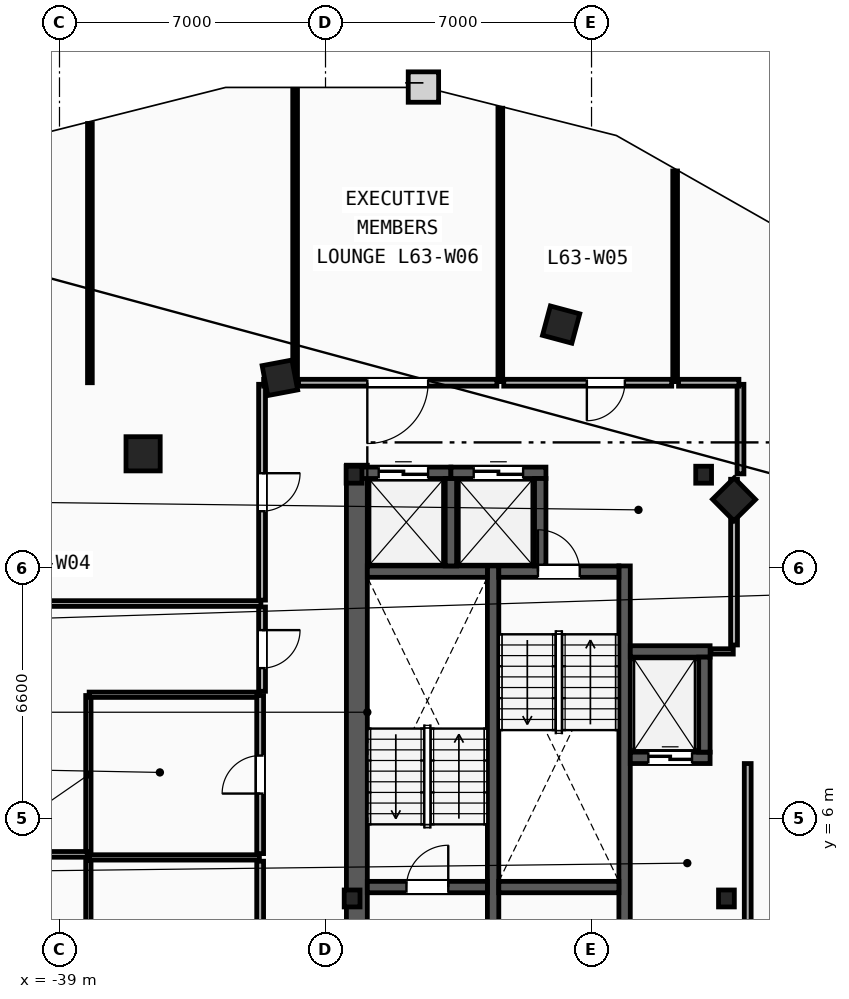
"""IFC4 building model, lengths in metres.
Left out: names, types, materials, properties, quantities, classifications, styles, units other than length and angle.
Written with IfcOpenShell. Run it as: python <this file> out.ifc"""

import sys

from ifc_helpers import new_model, si_unit, direction, frame, frame_2d, origin, origin_2d, place, context, subcontext, project, spatial, rectangle, i_section, extrude, element, fill, save


model = new_model("IFC4")
c1 = context("Model", 3, precision=1e-05, world=origin(), true_north=direction((0.0, 1.0)))
c2 = subcontext(c1, "Body", "Model", "MODEL_VIEW")
j1 = project(units=[si_unit("LENGTHUNIT", "METRE"), si_unit("PLANEANGLEUNIT", "RADIAN")], contexts=[c1])
p1 = place(None, origin())
s1 = spatial("IfcSite", under=j1, at=p1, CompositionType="ELEMENT")
p2 = place(p1, origin())
s2 = spatial("IfcBuilding", under=s1, at=p2, CompositionType="ELEMENT")
p3 = place(p2, frame((0.0, 0.0, 239.6)))
s3 = spatial("IfcBuildingStorey", under=s2, at=p3, CompositionType="ELEMENT", Elevation=239.6)
for number, where, z_axis, x_axis in (
    (1, (-31.3, 3.9, 0.0), (0.0, 0.0, 1.0), (1.0, 0.0, 0.0)),
    (2, (-21.45, 3.9, 0.0), (0.0, 0.0, 1.0), (1.0, 0.0, 0.0)),
    (3, (-22.05, 15.05, 0.0), (0.0, 0.0, 1.0), (1.0, 0.0, 0.0)),
    (4, (-31.25, 15.05, 0.0), (0.0, 0.0, 1.0), (1.0, 0.0, 0.0)),
):
    element("IfcColumn", number, at=place(p3, frame(where, z_axis=z_axis, x_axis=x_axis)), inside=s3, PredefinedType="COLUMN", context=c2, shape_type="SweptSolid", body=[
        extrude(i_section(OverallWidth=0.416, OverallDepth=0.446, WebThickness=0.039, FlangeThickness=0.063, FilletRadius=0.018, at=origin_2d()), origin(), (0.0, 0.0, 1.0), 3.6),
    ])
p4 = place(p3, frame((-36.8, 15.6, 0.0), z_axis=(0.0, 0.0, 1.0), x_axis=(1.0, 0.0, 0.0)))
e5 = element("IfcColumn", 5, at=p4, inside=s3, PredefinedType="COLUMN", context=c2, shape_type="SweptSolid", body=[
    extrude(rectangle(XDim=0.9, YDim=0.9, at=origin_2d()), origin(), (0.0, 0.0, 1.0), 3.6),
])
for number, where, z_axis, x_axis in (
    (6, (-21.25, 14.4, 0.0), (0.0, 0.0, 1.0), (-0.703, 0.711, 0.0)),
    (7, (-25.8, 19.0, 0.0), (0.0, 0.0, 1.0), (-0.966, 0.259, 0.0)),
    (8, (-33.2, 17.6, 0.0), (0.0, 0.0, 1.0), (-0.983, -0.186, 0.0)),
):
    element("IfcColumn", number, at=place(p3, frame(where, z_axis=z_axis, x_axis=x_axis)), inside=s3, PredefinedType="COLUMN", context=c2, shape_type="SweptSolid", body=[
        extrude(rectangle(XDim=0.8, YDim=0.8, at=origin_2d()), origin(), (0.0, 0.0, 1.0), 3.6),
    ])
p5 = place(p3, frame((-31.175, 1.97, 0.0), z_axis=(0.0, 0.0, 1.0), x_axis=(0.0, 1.0, 0.0)))
e9 = element("IfcWall", 9, at=p5, inside=s3, PredefinedType="SHEAR", context=c2, shape_type="SweptSolid", body=[
    extrude(rectangle(XDim=13.33, YDim=0.55, at=frame_2d((6.665, 0.0))), origin(), (0.0, 0.0, 1.0), 3.34),
])
for number, where, z_axis, x_axis in (
    (10, (-27.59, 1.97, 0.0), (0.0, 0.0, 1.0), (0.0, 1.0, 0.0)),
    (11, (-24.13, 1.97, 0.0), (0.0, 0.0, 1.0), (0.0, 1.0, 0.0)),
):
    element("IfcWall", number, at=place(p3, frame(where, z_axis=z_axis, x_axis=x_axis)), inside=s3, PredefinedType="SHEAR", context=c2, shape_type="SweptSolid", body=[
        extrude(rectangle(XDim=10.68, YDim=0.3, at=frame_2d((5.34, 0.0))), origin(), (0.0, 0.0, 1.0), 3.34),
    ])
p6 = place(p3, frame((-30.9, 4.2, 0.0), z_axis=(0.0, 0.0, 1.0), x_axis=(1.0, 0.0, 0.0)))
e12 = element("IfcWall", 12, at=p6, inside=s3, PredefinedType="SHEAR", context=c2, shape_type="SweptSolid", body=[
    extrude(rectangle(XDim=3.16, YDim=0.3, at=frame_2d((1.58, 0.0))), origin(), (0.0, 0.0, 1.0), 3.34),
])
p7 = place(p6, frame((1.03, 0.0, 0.0)))
e13 = element("IfcOpeningElement", 13, at=p7, cuts=e12, PredefinedType="OPENING", context=c2, shape_type="SweptSolid", body=[
    extrude(rectangle(XDim=1.1, YDim=2.15, at=frame_2d((0.55, 1.075))), frame((0.0, 0.16, 0.0), z_axis=(0.0, -1.0, 0.0), x_axis=(1.0, 0.0, 0.0)), (0.0, 0.0, 1.0), 0.32),
])
p8 = place(p3, frame((-30.9, 12.5, 0.0), z_axis=(0.0, 0.0, 1.0), x_axis=(1.0, 0.0, 0.0)))
e14 = element("IfcWall", 14, at=p8, inside=s3, PredefinedType="SHEAR", context=c2, shape_type="SweptSolid", body=[
    extrude(rectangle(XDim=3.16, YDim=0.3, at=frame_2d((1.58, 0.0))), origin(), (0.0, 0.0, 1.0), 3.34),
])
p9 = place(p3, frame((-27.44, 12.5, 0.0), z_axis=(0.0, 0.0, 1.0), x_axis=(1.0, 0.0, 0.0)))
e15 = element("IfcWall", 15, at=p9, inside=s3, PredefinedType="SHEAR", context=c2, shape_type="SweptSolid", body=[
    extrude(rectangle(XDim=3.16, YDim=0.3, at=frame_2d((1.58, 0.0))), origin(), (0.0, 0.0, 1.0), 3.34),
])
p10 = place(p9, frame((1.03, 0.0, 0.0)))
e16 = element("IfcOpeningElement", 16, at=p10, cuts=e15, PredefinedType="OPENING", context=c2, shape_type="SweptSolid", body=[
    extrude(rectangle(XDim=1.1, YDim=2.15, at=frame_2d((0.55, 1.075))), frame((0.0, 0.16, 0.0), z_axis=(0.0, -1.0, 0.0), x_axis=(1.0, 0.0, 0.0)), (0.0, 0.0, 1.0), 0.32),
])
p11 = place(p3, frame((-27.44, 4.2, 0.0), z_axis=(0.0, 0.0, 1.0), x_axis=(1.0, 0.0, 0.0)))
e17 = element("IfcWall", 17, at=p11, inside=s3, PredefinedType="SHEAR", context=c2, shape_type="SweptSolid", body=[
    extrude(rectangle(XDim=3.16, YDim=0.3, at=frame_2d((1.58, 0.0))), origin(), (0.0, 0.0, 1.0), 3.34),
])
p12 = place(p3, frame((-20.89, 2.15, 0.0), z_axis=(0.0, 0.0, 1.0), x_axis=(0.0, 1.0, 0.0)))
e18 = element("IfcWall", 18, at=p12, inside=s3, PredefinedType="PARTITIONING", context=c2, shape_type="SweptSolid", body=[
    extrude(rectangle(XDim=5.3, YDim=0.18, at=frame_2d((2.65, 0.0))), origin(), (0.0, 0.0, 1.0), 3.34),
])
p13 = place(p3, frame((-23.98, 7.6, 0.0), z_axis=(0.0, 0.0, 1.0), x_axis=(1.0, 0.0, 0.0)))
e19 = element("IfcWall", 19, at=p13, inside=s3, PredefinedType="SHEAR", context=c2, shape_type="SweptSolid", body=[
    extrude(rectangle(XDim=2.1, YDim=0.3, at=frame_2d((1.05, 0.0))), origin(), (0.0, 0.0, 1.0), 3.34),
])
p14 = place(p13, frame((0.475, 0.0, 0.0)))
e20 = element("IfcOpeningElement", 20, at=p14, cuts=e19, PredefinedType="OPENING", context=c2, shape_type="SweptSolid", body=[
    extrude(rectangle(XDim=1.15, YDim=2.2, at=frame_2d((0.575, 1.1))), frame((0.0, 0.16, 0.0), z_axis=(0.0, -1.0, 0.0), x_axis=(1.0, 0.0, 0.0)), (0.0, 0.0, 1.0), 0.32),
])
p15 = place(p3, frame((-23.98, 10.4, 0.0), z_axis=(0.0, 0.0, 1.0), x_axis=(1.0, 0.0, 0.0)))
e21 = element("IfcWall", 21, at=p15, inside=s3, PredefinedType="SHEAR", context=c2, shape_type="SweptSolid", body=[
    extrude(rectangle(XDim=2.1, YDim=0.3, at=frame_2d((1.05, 0.0))), origin(), (0.0, 0.0, 1.0), 3.34),
])
p16 = place(p3, frame((-22.03, 7.75, 0.0), z_axis=(0.0, 0.0, 1.0), x_axis=(0.0, 1.0, 0.0)))
e22 = element("IfcWall", 22, at=p16, inside=s3, PredefinedType="SHEAR", context=c2, shape_type="SweptSolid", body=[
    extrude(rectangle(XDim=2.5, YDim=0.3, at=frame_2d((1.25, 0.0))), origin(), (0.0, 0.0, 1.0), 3.34),
])
p17 = place(p3, frame((-31.2, 15.1, 0.0), z_axis=(0.0, 0.0, 1.0), x_axis=(1.0, 0.0, 0.0)))
e23 = element("IfcWall", 23, at=p17, inside=s3, PredefinedType="SHEAR", context=c2, shape_type="SweptSolid", body=[
    extrude(rectangle(XDim=2.5, YDim=0.3, at=frame_2d((1.25, 0.0))), origin(), (0.0, 0.0, 1.0), 3.34),
])
p18 = place(p17, frame((0.6, 0.0, 0.0)))
e24 = element("IfcOpeningElement", 24, at=p18, cuts=e23, PredefinedType="OPENING", context=c2, shape_type="SweptSolid", body=[
    extrude(rectangle(XDim=1.3, YDim=2.2, at=frame_2d((0.65, 1.1))), frame((0.0, 0.16, 0.0), z_axis=(0.0, -1.0, 0.0), x_axis=(1.0, 0.0, 0.0)), (0.0, 0.0, 1.0), 0.32),
])
p19 = place(p3, frame((-28.7, 12.65, 0.0), z_axis=(0.0, 0.0, 1.0), x_axis=(0.0, 1.0, 0.0)))
e25 = element("IfcWall", 25, at=p19, inside=s3, PredefinedType="SHEAR", context=c2, shape_type="SweptSolid", body=[
    extrude(rectangle(XDim=2.3, YDim=0.3, at=frame_2d((1.15, 0.0))), origin(), (0.0, 0.0, 1.0), 3.34),
])
p20 = place(p3, frame((-28.7, 15.1, 0.0), z_axis=(0.0, 0.0, 1.0), x_axis=(1.0, 0.0, 0.0)))
e26 = element("IfcWall", 26, at=p20, inside=s3, PredefinedType="SHEAR", context=c2, shape_type="SweptSolid", body=[
    extrude(rectangle(XDim=2.5, YDim=0.3, at=frame_2d((1.25, 0.0))), origin(), (0.0, 0.0, 1.0), 3.34),
])
p21 = place(p20, frame((0.6, 0.0, 0.0)))
e27 = element("IfcOpeningElement", 27, at=p21, cuts=e26, PredefinedType="OPENING", context=c2, shape_type="SweptSolid", body=[
    extrude(rectangle(XDim=1.3, YDim=2.2, at=frame_2d((0.65, 1.1))), frame((0.0, 0.16, 0.0), z_axis=(0.0, -1.0, 0.0), x_axis=(1.0, 0.0, 0.0)), (0.0, 0.0, 1.0), 0.32),
])
p22 = place(p3, frame((-26.35, 12.65, 0.0), z_axis=(0.0, 0.0, 1.0), x_axis=(0.0, 1.0, 0.0)))
e28 = element("IfcWall", 28, at=p22, inside=s3, PredefinedType="SHEAR", context=c2, shape_type="SweptSolid", body=[
    extrude(rectangle(XDim=2.3, YDim=0.3, at=frame_2d((1.15, 0.0))), origin(), (0.0, 0.0, 1.0), 3.34),
])
p23 = place(p3, frame((-21.86, 10.4, 0.0), z_axis=(0.0, 0.0, 1.0), x_axis=(1.0, 0.0, 0.0)))
e29 = element("IfcWall", 29, at=p23, inside=s3, PredefinedType="PARTITIONING", context=c2, shape_type="SweptSolid", body=[
    extrude(rectangle(XDim=0.59, YDim=0.14, at=frame_2d((0.295, 0.0))), origin(), (0.0, 0.0, 1.0), 3.34),
])
p24 = place(p3, frame((-21.25, 10.57, 0.0), z_axis=(0.0, 0.0, 1.0), x_axis=(0.0, 1.0, 0.0)))
e30 = element("IfcWall", 30, at=p24, inside=s3, PredefinedType="PARTITIONING", context=c2, shape_type="SweptSolid", body=[
    extrude(rectangle(XDim=4.36, YDim=0.18, at=frame_2d((2.18, 0.0))), origin(), (0.0, 0.0, 1.0), 3.34),
])
p25 = place(p3, frame((-38.24, 0.62, 0.0), z_axis=(0.0, 0.0, 1.0), x_axis=(0.0, 1.0, 0.0)))
e31 = element("IfcWall", 31, at=p25, inside=s3, PredefinedType="PARTITIONING", context=c2, shape_type="SweptSolid", body=[
    extrude(rectangle(XDim=4.275, YDim=0.14, at=frame_2d((2.137, 0.0))), origin(), (0.0, 0.0, 1.0), 3.34),
])
p26 = place(p3, frame((-38.24, 5.065, 0.0), z_axis=(0.0, 0.0, 1.0), x_axis=(0.0, 1.0, 0.0)))
e32 = element("IfcWall", 32, at=p26, inside=s3, PredefinedType="PARTITIONING", context=c2, shape_type="SweptSolid", body=[
    extrude(rectangle(XDim=4.175, YDim=0.14, at=frame_2d((2.087, 0.0))), origin(), (0.0, 0.0, 1.0), 3.34),
])
for number, where, z_axis, x_axis in (
    (33, (-38.22, 4.98, 0.0), (0.0, 0.0, 1.0), (1.0, 0.0, 0.0)),
    (34, (-38.22, 9.26, 0.0), (0.0, 0.0, 1.0), (1.0, 0.0, 0.0)),
):
    element("IfcWall", number, at=place(p3, frame(where, z_axis=z_axis, x_axis=x_axis)), inside=s3, PredefinedType="PARTITIONING", context=c2, shape_type="SweptSolid", body=[
        extrude(rectangle(XDim=4.48, YDim=0.14, at=frame_2d((2.24, 0.0))), origin(), (0.0, 0.0, 1.0), 3.34),
    ])
p27 = place(p3, frame((-33.72, 0.62, 0.0), z_axis=(0.0, 0.0, 1.0), x_axis=(0.0, 1.0, 0.0)))
e35 = element("IfcWall", 35, at=p27, inside=s3, PredefinedType="PARTITIONING", context=c2, shape_type="SweptSolid", body=[
    extrude(rectangle(XDim=4.26, YDim=0.18, at=frame_2d((2.13, 0.0))), origin(), (0.0, 0.0, 1.0), 3.34),
])
p28 = place(p27, frame((1.655, 0.0, 0.0)))
e36 = element("IfcOpeningElement", 36, at=p28, cuts=e35, PredefinedType="OPENING", context=c2, shape_type="SweptSolid", body=[
    extrude(rectangle(XDim=0.95, YDim=2.1, at=frame_2d((0.475, 1.05))), frame((0.0, 0.1, 0.0), z_axis=(0.0, -1.0, 0.0), x_axis=(1.0, 0.0, 0.0)), (0.0, 0.0, 1.0), 0.2),
])
p29 = place(p3, frame((-33.72, 5.08, 0.0), z_axis=(0.0, 0.0, 1.0), x_axis=(0.0, 1.0, 0.0)))
e37 = element("IfcWall", 37, at=p29, inside=s3, PredefinedType="PARTITIONING", context=c2, shape_type="SweptSolid", body=[
    extrude(rectangle(XDim=4.16, YDim=0.18, at=frame_2d((2.08, 0.0))), origin(), (0.0, 0.0, 1.0), 3.34),
])
p30 = place(p29, frame((1.58, 0.0, 0.0)))
e38 = element("IfcOpeningElement", 38, at=p30, cuts=e37, PredefinedType="OPENING", context=c2, shape_type="SweptSolid", body=[
    extrude(rectangle(XDim=1.0, YDim=2.15, at=frame_2d((0.5, 1.075))), frame((0.0, 0.1, 0.0), z_axis=(0.0, -1.0, 0.0), x_axis=(1.0, 0.0, 0.0)), (0.0, 0.0, 1.0), 0.2),
])
p31 = place(p3, frame((-50.913, 5.06, 0.0), z_axis=(0.0, 0.0, 1.0), x_axis=(1.0, 0.0, 0.0)))
e39 = element("IfcWall", 39, at=p31, inside=s3, PredefinedType="PARTITIONING", context=c2, shape_type="SweptSolid", body=[
    extrude(rectangle(XDim=12.643, YDim=0.15, at=frame_2d((6.321, 0.0))), origin(), (0.0, 0.0, 1.0), 3.34),
])
p32 = place(p3, frame((-49.883, 11.66, 0.0), z_axis=(0.0, 0.0, 1.0), x_axis=(1.0, 0.0, 0.0)))
e40 = element("IfcWall", 40, at=p32, inside=s3, PredefinedType="PARTITIONING", context=c2, shape_type="SweptSolid", body=[
    extrude(rectangle(XDim=16.183, YDim=0.15, at=frame_2d((8.091, 0.0))), origin(), (0.0, 0.0, 1.0), 3.34),
])
p33 = place(p3, frame((-38.2, 17.47, 0.0), z_axis=(0.0, 0.0, 1.0), x_axis=(0.0, 1.0, 0.0)))
e41 = element("IfcWall", 41, at=p33, inside=s3, PredefinedType="PARTITIONING", context=c2, shape_type="SweptSolid", body=[
    extrude(rectangle(XDim=6.82, YDim=0.125, at=frame_2d((3.41, 0.0))), origin(), (0.0, 0.0, 1.0), 3.34),
])
p34 = place(p3, frame((-32.8, 17.5, 0.0), z_axis=(0.0, 0.0, 1.0), x_axis=(0.0, 1.0, 0.0)))
e42 = element("IfcWall", 42, at=p34, inside=s3, PredefinedType="PARTITIONING", context=c2, shape_type="SweptSolid", body=[
    extrude(rectangle(XDim=7.69, YDim=0.125, at=frame_2d((3.845, 0.0))), origin(), (0.0, 0.0, 1.0), 3.34),
])
p35 = place(p3, frame((-27.4, 17.5, 0.0), z_axis=(0.0, 0.0, 1.0), x_axis=(0.0, 1.0, 0.0)))
e43 = element("IfcWall", 43, at=p35, inside=s3, PredefinedType="PARTITIONING", context=c2, shape_type="SweptSolid", body=[
    extrude(rectangle(XDim=7.193, YDim=0.125, at=frame_2d((3.596, 0.0))), origin(), (0.0, 0.0, 1.0), 3.34),
])
p36 = place(p3, frame((-22.8, 17.5, 0.0), z_axis=(0.0, 0.0, 1.0), x_axis=(0.0, 1.0, 0.0)))
e44 = element("IfcWall", 44, at=p36, inside=s3, PredefinedType="PARTITIONING", context=c2, shape_type="SweptSolid", body=[
    extrude(rectangle(XDim=5.542, YDim=0.125, at=frame_2d((2.771, 0.0))), origin(), (0.0, 0.0, 1.0), 3.34),
])
p37 = place(p3, frame((-33.67, 11.57, 0.0), z_axis=(0.0, 0.0, 1.0), x_axis=(0.0, -1.0, 0.0)))
e45 = element("IfcWall", 45, at=p37, inside=s3, PredefinedType="PARTITIONING", context=c2, shape_type="SweptSolid", body=[
    extrude(rectangle(XDim=2.219, YDim=0.18, at=frame_2d((1.109, 0.0))), origin(), (0.0, 0.0, 1.0), 3.34),
])
p38 = place(p37, frame((0.609, 0.0, 0.0)))
e46 = element("IfcOpeningElement", 46, at=p38, cuts=e45, PredefinedType="OPENING", context=c2, shape_type="SweptSolid", body=[
    extrude(rectangle(XDim=1.0, YDim=2.15, at=frame_2d((0.5, 1.075))), frame((0.0, 0.1, 0.0), z_axis=(0.0, -1.0, 0.0), x_axis=(1.0, 0.0, 0.0)), (0.0, 0.0, 1.0), 0.2),
])
p39 = place(p3, frame((-21.08, 15.072, 0.0), z_axis=(0.0, 0.0, 1.0), x_axis=(0.0, 1.0, 0.0)))
e47 = element("IfcWall", 47, at=p39, inside=s3, PredefinedType="PARTITIONING", context=c2, shape_type="SweptSolid", body=[
    extrude(rectangle(XDim=2.357, YDim=0.18, at=frame_2d((1.178, 0.0))), origin(), (0.0, 0.0, 1.0), 3.34),
])
p40 = place(p3, frame((-21.122, 17.47, 0.0), z_axis=(0.0, 0.0, 1.0), x_axis=(-1.0, 0.0, 0.0)))
e48 = element("IfcWall", 48, at=p40, inside=s3, PredefinedType="PARTITIONING", context=c2, shape_type="SweptSolid", body=[
    extrude(rectangle(XDim=1.588, YDim=0.18, at=frame_2d((0.794, 0.0))), origin(), (0.0, 0.0, 1.0), 3.34),
])
p41 = place(p3, frame((-33.67, 17.428, 0.0), z_axis=(0.0, 0.0, 1.0), x_axis=(0.0, -1.0, 0.0)))
e49 = element("IfcWall", 49, at=p41, inside=s3, PredefinedType="PARTITIONING", context=c2, shape_type="SweptSolid", body=[
    extrude(rectangle(XDim=5.678, YDim=0.18, at=frame_2d((2.839, 0.0))), origin(), (0.0, 0.0, 1.0), 3.34),
])
p42 = place(p41, frame((2.339, 0.0, 0.0)))
e50 = element("IfcOpeningElement", 50, at=p42, cuts=e49, PredefinedType="OPENING", context=c2, shape_type="SweptSolid", body=[
    extrude(rectangle(XDim=1.0, YDim=2.15, at=frame_2d((0.5, 1.075))), frame((0.0, 0.1, 0.0), z_axis=(0.0, -1.0, 0.0), x_axis=(1.0, 0.0, 0.0)), (0.0, 0.0, 1.0), 0.2),
])
p43 = place(p3, frame((-32.89, 17.47, 0.0), z_axis=(0.0, 0.0, 1.0), x_axis=(-1.0, 0.0, 0.0)))
e51 = element("IfcWall", 51, at=p43, inside=s3, PredefinedType="PARTITIONING", context=c2, shape_type="SweptSolid", body=[
    extrude(rectangle(XDim=0.739, YDim=0.18, at=frame_2d((0.369, 0.0))), origin(), (0.0, 0.0, 1.0), 3.34),
])
p44 = place(p3, frame((-22.89, 17.47, 0.0), z_axis=(0.0, 0.0, 1.0), x_axis=(-1.0, 0.0, 0.0)))
e52 = element("IfcWall", 52, at=p44, inside=s3, PredefinedType="PARTITIONING", context=c2, shape_type="SweptSolid", body=[
    extrude(rectangle(XDim=4.42, YDim=0.18, at=frame_2d((2.21, 0.0))), origin(), (0.0, 0.0, 1.0), 3.34),
])
p45 = place(p44, frame((1.233, 0.0, 0.0)))
e53 = element("IfcOpeningElement", 53, at=p45, cuts=e52, PredefinedType="OPENING", context=c2, shape_type="SweptSolid", body=[
    extrude(rectangle(XDim=1.0, YDim=2.15, at=frame_2d((0.5, 1.075))), frame((0.0, 0.1, 0.0), z_axis=(0.0, -1.0, 0.0), x_axis=(1.0, 0.0, 0.0)), (0.0, 0.0, 1.0), 0.2),
])
p46 = place(p3, frame((-27.49, 17.47, 0.0), z_axis=(0.0, 0.0, 1.0), x_axis=(-1.0, 0.0, 0.0)))
e54 = element("IfcWall", 54, at=p46, inside=s3, PredefinedType="PARTITIONING", context=c2, shape_type="SweptSolid", body=[
    extrude(rectangle(XDim=5.22, YDim=0.18, at=frame_2d((2.61, 0.0))), origin(), (0.0, 0.0, 1.0), 3.34),
])
p47 = place(p46, frame((1.81, 0.0, 0.0)))
e55 = element("IfcOpeningElement", 55, at=p47, cuts=e54, PredefinedType="OPENING", context=c2, shape_type="SweptSolid", body=[
    extrude(rectangle(XDim=1.6, YDim=2.2, at=frame_2d((0.8, 1.1))), frame((0.0, 0.1, 0.0), z_axis=(0.0, -1.0, 0.0), x_axis=(1.0, 0.0, 0.0)), (0.0, 0.0, 1.0), 0.2),
])
p48 = place(p7, origin())
e56 = element("IfcDoor", 56, at=p48, inside=s3, OperationType="SINGLE_SWING_RIGHT", PredefinedType="DOOR", context=c2, shape_type="SweptSolid", body=[
    extrude(rectangle(XDim=1.1, YDim=2.15, at=frame_2d((0.55, 1.075))), frame((0.0, 0.025, 0.0), z_axis=(0.0, -1.0, 0.0), x_axis=(1.0, 0.0, 0.0)), (0.0, 0.0, 1.0), 0.05),
])
fill(e13, e56)
p49 = place(p10, origin())
e57 = element("IfcDoor", 57, at=p49, inside=s3, OperationType="SINGLE_SWING_LEFT", PredefinedType="DOOR", context=c2, shape_type="SweptSolid", body=[
    extrude(rectangle(XDim=1.1, YDim=2.15, at=frame_2d((0.55, 1.075))), frame((0.0, 0.025, 0.0), z_axis=(0.0, -1.0, 0.0), x_axis=(1.0, 0.0, 0.0)), (0.0, 0.0, 1.0), 0.05),
])
fill(e16, e57)
p50 = place(p14, origin())
e58 = element("IfcDoor", 58, at=p50, inside=s3, OperationType="SLIDING_TO_LEFT", PredefinedType="TRAPDOOR", context=c2, shape_type="SweptSolid", body=[
    extrude(rectangle(XDim=1.15, YDim=2.2, at=frame_2d((0.575, 1.1))), frame((0.0, 0.025, 0.0), z_axis=(0.0, -1.0, 0.0), x_axis=(1.0, 0.0, 0.0)), (0.0, 0.0, 1.0), 0.05),
])
fill(e20, e58)
p51 = place(p18, origin())
e59 = element("IfcDoor", 59, at=p51, inside=s3, OperationType="SLIDING_TO_LEFT", PredefinedType="TRAPDOOR", context=c2, shape_type="SweptSolid", body=[
    extrude(rectangle(XDim=1.3, YDim=2.2, at=frame_2d((0.65, 1.1))), frame((0.0, 0.025, 0.0), z_axis=(0.0, -1.0, 0.0), x_axis=(1.0, 0.0, 0.0)), (0.0, 0.0, 1.0), 0.05),
])
fill(e24, e59)
p52 = place(p21, origin())
e60 = element("IfcDoor", 60, at=p52, inside=s3, OperationType="SLIDING_TO_LEFT", PredefinedType="TRAPDOOR", context=c2, shape_type="SweptSolid", body=[
    extrude(rectangle(XDim=1.3, YDim=2.2, at=frame_2d((0.65, 1.1))), frame((0.0, 0.025, 0.0), z_axis=(0.0, -1.0, 0.0), x_axis=(1.0, 0.0, 0.0)), (0.0, 0.0, 1.0), 0.05),
])
fill(e27, e60)
p53 = place(p42, origin())
e61 = element("IfcDoor", 61, at=p53, inside=s3, OperationType="SINGLE_SWING_LEFT", PredefinedType="DOOR", context=c2, shape_type="SweptSolid", body=[
    extrude(rectangle(XDim=1.0, YDim=2.15, at=frame_2d((0.5, 1.075))), frame((0.0, 0.025, 0.0), z_axis=(0.0, -1.0, 0.0), x_axis=(1.0, 0.0, 0.0)), (0.0, 0.0, 1.0), 0.05),
])
fill(e50, e61)
p54 = place(p47, origin())
e62 = element("IfcDoor", 62, at=p54, inside=s3, OperationType="SINGLE_SWING_RIGHT", PredefinedType="DOOR", context=c2, shape_type="SweptSolid", body=[
    extrude(rectangle(XDim=1.6, YDim=2.2, at=frame_2d((0.8, 1.1))), frame((0.0, 0.025, 0.0), z_axis=(0.0, -1.0, 0.0), x_axis=(1.0, 0.0, 0.0)), (0.0, 0.0, 1.0), 0.05),
])
fill(e55, e62)
p55 = place(p45, origin())
e63 = element("IfcDoor", 63, at=p55, inside=s3, OperationType="SINGLE_SWING_RIGHT", PredefinedType="DOOR", context=c2, shape_type="SweptSolid", body=[
    extrude(rectangle(XDim=1.0, YDim=2.15, at=frame_2d((0.5, 1.075))), frame((0.0, 0.025, 0.0), z_axis=(0.0, -1.0, 0.0), x_axis=(1.0, 0.0, 0.0)), (0.0, 0.0, 1.0), 0.05),
])
fill(e53, e63)
p56 = place(p30, origin())
e64 = element("IfcDoor", 64, at=p56, inside=s3, OperationType="SINGLE_SWING_LEFT", PredefinedType="DOOR", context=c2, shape_type="SweptSolid", body=[
    extrude(rectangle(XDim=1.0, YDim=2.15, at=frame_2d((0.5, 1.075))), frame((0.0, 0.025, 0.0), z_axis=(0.0, -1.0, 0.0), x_axis=(1.0, 0.0, 0.0)), (0.0, 0.0, 1.0), 0.05),
])
fill(e38, e64)
p57 = place(p38, origin())
e65 = element("IfcDoor", 65, at=p57, inside=s3, OperationType="SINGLE_SWING_LEFT", PredefinedType="DOOR", context=c2, shape_type="SweptSolid", body=[
    extrude(rectangle(XDim=1.0, YDim=2.15, at=frame_2d((0.5, 1.075))), frame((0.0, 0.025, 0.0), z_axis=(0.0, -1.0, 0.0), x_axis=(1.0, 0.0, 0.0)), (0.0, 0.0, 1.0), 0.05),
])
fill(e46, e65)
save(model, sys.argv[1])
